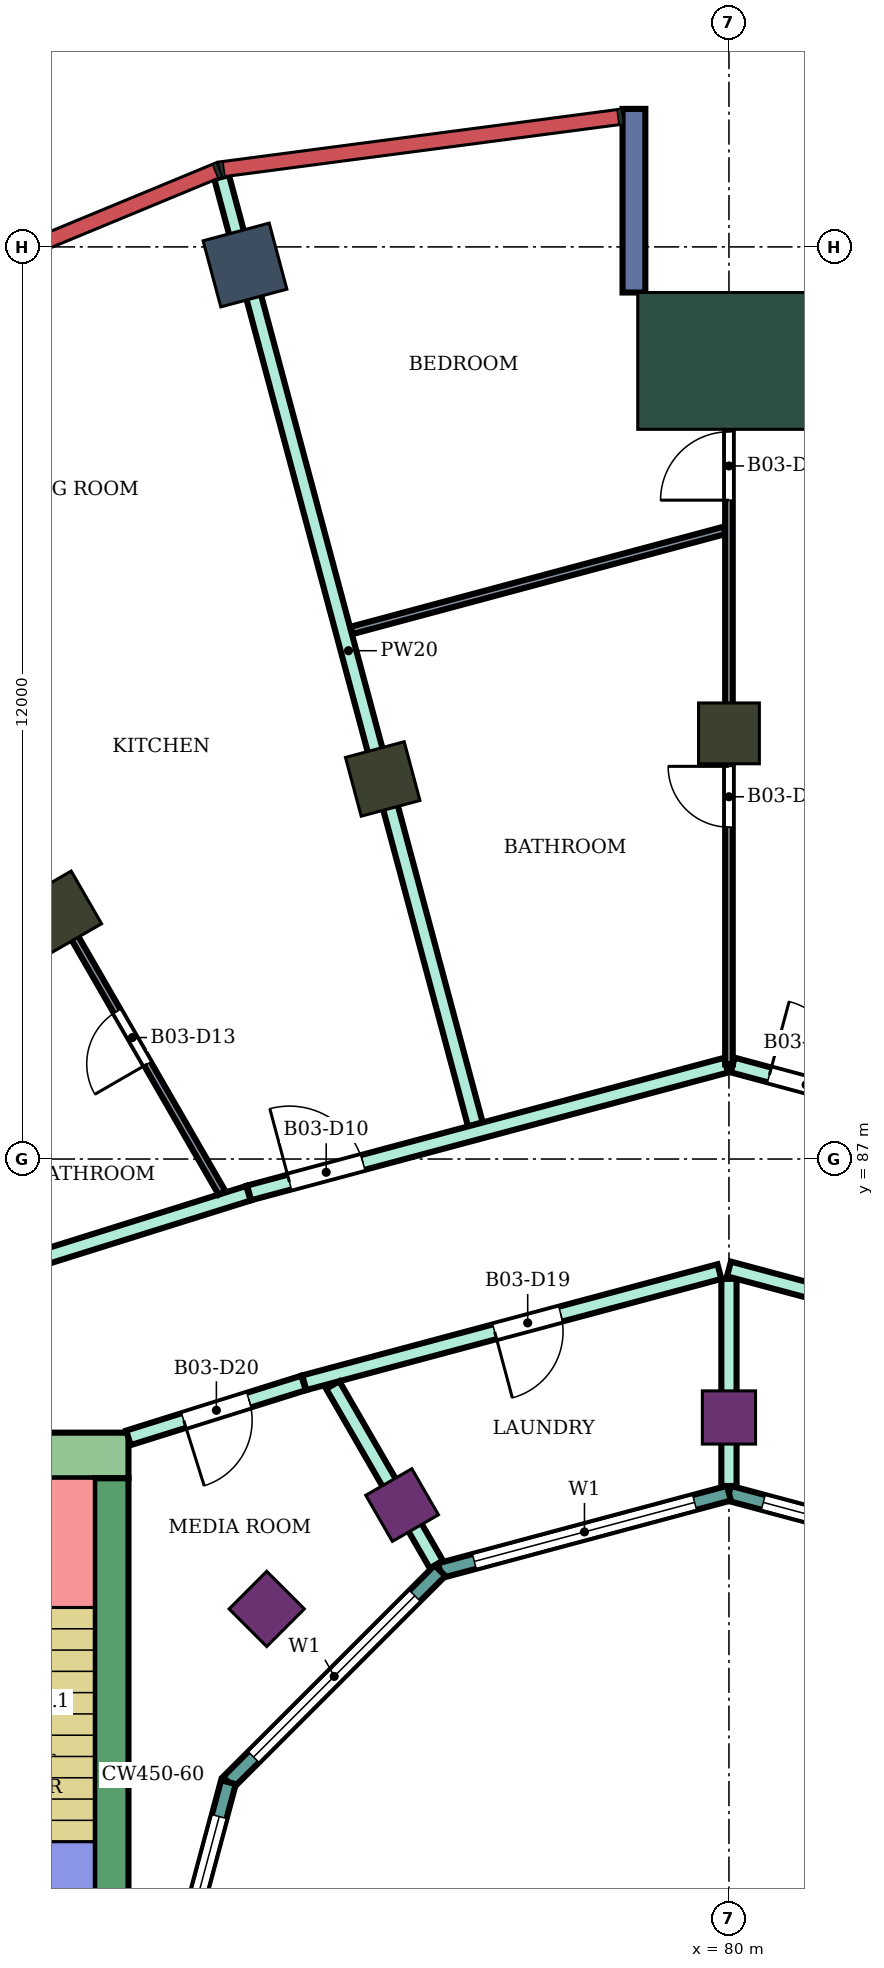
"""IFC4 building model, lengths in metres.
Left out: names, types, materials, properties, quantities, classifications, styles, units other than length and angle.
Written with IfcOpenShell. Run it as: python <this file> out.ifc"""

import sys

from ifc_helpers import new_model, si_unit, direction, frame, frame_2d, origin, origin_2d, place, context, subcontext, project, spatial, rectangle, extrude, element, fill, save


model = new_model("IFC4")
c1 = context("Model", 3, precision=1e-05, world=origin(), true_north=direction((0.0, 1.0)))
c2 = subcontext(c1, "Body", "Model", "MODEL_VIEW")
j1 = project(units=[si_unit("LENGTHUNIT", "METRE"), si_unit("PLANEANGLEUNIT", "RADIAN")], contexts=[c1])
p1 = place(None, origin())
s1 = spatial("IfcSite", under=j1, at=p1, CompositionType="ELEMENT")
p2 = place(p1, origin())
s2 = spatial("IfcBuilding", under=s1, at=p2, CompositionType="ELEMENT")
p3 = place(p2, frame((0.0, 0.0, 241.5)))
s3 = spatial("IfcBuildingStorey", under=s2, at=p3, CompositionType="ELEMENT", Elevation=241.5)
p4 = place(p3, frame((73.633, 98.762, 0.0), z_axis=(0.0, 0.0, 1.0), x_axis=(-0.258819045103, 0.965925826289, 0.0)))
e1 = element("IfcColumn", 1, at=p4, inside=s3, PredefinedType="COLUMN", context=c2, shape_type="SweptSolid", body=[
    extrude(rectangle(XDim=0.9, YDim=0.9, at=origin_2d()), origin(), (0.0, 0.0, 1.0), 4.2),
])
for number, where, z_axis, x_axis in (
    (2, (80.0, 92.6, 0.0), (0.0, 0.0, 1.0), (0.0, 1.0, 0.0)),
    (3, (75.445, 92.0, 0.0), (0.0, 0.0, 1.0), (-0.259, 0.966, 0.0)),
    (4, (71.2, 90.242, 0.0), (0.0, 0.0, 1.0), (-0.5, 0.866, 0.0)),
):
    element("IfcColumn", number, at=place(p3, frame(where, z_axis=z_axis, x_axis=x_axis)), inside=s3, PredefinedType="COLUMN", context=c2, shape_type="SweptSolid", body=[
        extrude(rectangle(XDim=0.8, YDim=0.8, at=origin_2d()), origin(), (0.0, 0.0, 1.0), 4.2),
    ])
for number, where, z_axis, x_axis in (
    (5, (80.0, 83.6, 0.0), (0.0, 0.0, 1.0), (0.0, 1.0, 0.0)),
    (6, (75.7, 82.448, 0.0), (0.0, 0.0, 1.0), (-0.5, 0.866, 0.0)),
    (7, (73.919, 81.081, 0.0), (0.0, 0.0, 1.0), (-0.707, 0.707, 0.0)),
):
    element("IfcColumn", number, at=place(p3, frame(where, z_axis=z_axis, x_axis=x_axis)), inside=s3, PredefinedType="COLUMN", context=c2, shape_type="SweptSolid", body=[
        extrude(rectangle(XDim=0.7, YDim=0.7, at=origin_2d()), origin(), (0.0, 0.0, 1.0), 4.2),
    ])
p5 = place(p3, frame((80.0, 97.5, 0.0), z_axis=(0.0, 0.0, 1.0), x_axis=(0.0, 1.0, 0.0)))
e8 = element("IfcColumn", 8, at=p5, inside=s3, PredefinedType="COLUMN", context=c2, shape_type="SweptSolid", body=[
    extrude(rectangle(XDim=1.8, YDim=2.4, at=origin_2d()), origin(), (0.0, 0.0, 1.0), 4.2),
])
p6 = place(p3, frame((72.1, 83.1, 0.0), z_axis=(0.0, 0.0, 1.0), x_axis=(-1.0, 0.0, 0.0)))
e9 = element("IfcWall", 9, at=p6, inside=s3, PredefinedType="SHEAR", context=c2, shape_type="SweptSolid", body=[
    extrude(rectangle(XDim=14.9, YDim=0.6, at=frame_2d((7.45, 0.0))), origin(), (0.0, 0.0, 1.0), 3.88),
])
p7 = place(p6, frame((4.2, 0.0, 0.0)))
e10 = element("IfcOpeningElement", 10, at=p7, cuts=e9, PredefinedType="OPENING", context=c2, shape_type="SweptSolid", body=[
    extrude(rectangle(XDim=2.4, YDim=2.4, at=frame_2d((1.2, 1.2))), frame((0.0, 0.31, 0.0), z_axis=(0.0, -1.0, 0.0), x_axis=(1.0, 0.0, 0.0)), (0.0, 0.0, 1.0), 0.62),
])
p8 = place(p3, frame((71.875, 82.8, 0.0), z_axis=(0.0, 0.0, 1.0), x_axis=(0.0, -1.0, 0.0)))
e11 = element("IfcWall", 11, at=p8, inside=s3, PredefinedType="SHEAR", context=c2, shape_type="SweptSolid", body=[
    extrude(rectangle(XDim=7.8, YDim=0.45, at=frame_2d((3.9, 0.0))), origin(), (0.0, 0.0, 1.0), 3.88),
])
p9 = place(p3, frame((78.75, 98.4, 0.0), z_axis=(0.0, 0.0, 1.0), x_axis=(0.0, 1.0, 0.0)))
e12 = element("IfcWall", 12, at=p9, inside=s3, PredefinedType="NOTDEFINED", context=c2, shape_type="SweptSolid", body=[
    extrude(rectangle(XDim=2.416, YDim=0.3, at=frame_2d((1.208, 0.0))), origin(), (0.0, 0.0, 1.0), 4.2),
])
p10 = place(p3, frame((83.802, 81.585, 0.0), z_axis=(0.0, 0.0, 1.0), x_axis=(-0.965933654434, 0.258789828301, 0.0)))
e13 = element("IfcWall", 13, at=p10, inside=s3, PredefinedType="NOTDEFINED", context=c2, shape_type="SweptSolid", body=[
    extrude(rectangle(XDim=3.936, YDim=0.2, at=frame_2d((1.968, 0.0))), origin(), (0.0, 0.0, 1.0), 4.2),
])
p11 = place(p10, frame((0.468, 0.0, 0.9)))
e14 = element("IfcOpeningElement", 14, at=p11, cuts=e13, PredefinedType="OPENING", context=c2, shape_type="SweptSolid", body=[
    extrude(rectangle(XDim=3.0, YDim=2.3, at=frame_2d((1.5, 1.15))), frame((0.0, 0.11, 0.0), z_axis=(0.0, -1.0, 0.0), x_axis=(1.0, 0.0, 0.0)), (0.0, 0.0, 1.0), 0.22),
])
p12 = place(p3, frame((80.0, 82.604, 0.0), z_axis=(0.0, 0.0, 1.0), x_axis=(-0.965933654434, -0.258789828301, 0.0)))
e15 = element("IfcWall", 15, at=p12, inside=s3, PredefinedType="NOTDEFINED", context=c2, shape_type="SweptSolid", body=[
    extrude(rectangle(XDim=3.936, YDim=0.2, at=frame_2d((1.968, 0.0))), origin(), (0.0, 0.0, 1.0), 4.2),
])
p13 = place(p12, frame((0.468, 0.0, 0.9)))
e16 = element("IfcOpeningElement", 16, at=p13, cuts=e15, PredefinedType="OPENING", context=c2, shape_type="SweptSolid", body=[
    extrude(rectangle(XDim=3.0, YDim=2.3, at=frame_2d((1.5, 1.15))), frame((0.0, 0.11, 0.0), z_axis=(0.0, -1.0, 0.0), x_axis=(1.0, 0.0, 0.0)), (0.0, 0.0, 1.0), 0.22),
])
p14 = place(p3, frame((76.198, 81.585, 0.0), z_axis=(0.0, 0.0, 1.0), x_axis=(-0.707106781187, -0.707106781187, 0.0)))
e17 = element("IfcWall", 17, at=p14, inside=s3, PredefinedType="NOTDEFINED", context=c2, shape_type="SweptSolid", body=[
    extrude(rectangle(XDim=3.936, YDim=0.2, at=frame_2d((1.968, 0.0))), origin(), (0.0, 0.0, 1.0), 4.2),
])
p15 = place(p14, frame((0.468, 0.0, 0.9)))
e18 = element("IfcOpeningElement", 18, at=p15, cuts=e17, PredefinedType="OPENING", context=c2, shape_type="SweptSolid", body=[
    extrude(rectangle(XDim=3.0, YDim=2.3, at=frame_2d((1.5, 1.15))), frame((0.0, 0.11, 0.0), z_axis=(0.0, -1.0, 0.0), x_axis=(1.0, 0.0, 0.0)), (0.0, 0.0, 1.0), 0.22),
])
p16 = place(p3, frame((73.415, 78.802, 0.0), z_axis=(0.0, 0.0, 1.0), x_axis=(-0.258789828301, -0.965933654434, 0.0)))
e19 = element("IfcWall", 19, at=p16, inside=s3, PredefinedType="NOTDEFINED", context=c2, shape_type="SweptSolid", body=[
    extrude(rectangle(XDim=3.936, YDim=0.2, at=frame_2d((1.968, 0.0))), origin(), (0.0, 0.0, 1.0), 4.2),
])
p17 = place(p16, frame((0.468, 0.0, 0.9)))
e20 = element("IfcOpeningElement", 20, at=p17, cuts=e19, PredefinedType="OPENING", context=c2, shape_type="SweptSolid", body=[
    extrude(rectangle(XDim=3.0, YDim=2.3, at=frame_2d((1.5, 1.15))), frame((0.0, 0.11, 0.0), z_axis=(0.0, -1.0, 0.0), x_axis=(1.0, 0.0, 0.0)), (0.0, 0.0, 1.0), 0.22),
])
p18 = place(p3, frame((68.2, 84.834, 0.0), z_axis=(0.0, 0.0, 1.0), x_axis=(0.954272398161, 0.298938438661, 0.0)))
e21 = element("IfcWall", 21, at=p18, inside=s3, PredefinedType="PARTITIONING", context=c2, shape_type="SweptSolid", body=[
    extrude(rectangle(XDim=5.74, YDim=0.2, at=frame_2d((2.87, 0.0))), origin(), (0.0, 0.0, 1.0), 3.75),
])
p19 = place(p3, frame((72.1, 83.332, 0.0), z_axis=(0.0, 0.0, 1.0), x_axis=(0.954233106619, 0.299063836383, 0.0)))
e22 = element("IfcWall", 22, at=p19, inside=s3, PredefinedType="PARTITIONING", context=c2, shape_type="SweptSolid", body=[
    extrude(rectangle(XDim=2.414, YDim=0.2, at=frame_2d((1.207, 0.0))), origin(), (0.0, 0.0, 1.0), 3.75),
])
p20 = place(p19, frame((0.762, 0.0, 0.0)))
e23 = element("IfcOpeningElement", 23, at=p20, cuts=e22, PredefinedType="OPENING", context=c2, shape_type="SweptSolid", body=[
    extrude(rectangle(XDim=0.9, YDim=2.1, at=frame_2d((0.45, 1.05))), frame((0.0, 0.11, 0.0), z_axis=(0.0, -1.0, 0.0), x_axis=(1.0, 0.0, 0.0)), (0.0, 0.0, 1.0), 0.22),
])
p21 = place(p3, frame((73.325, 99.92, 0.0), z_axis=(0.0, 0.0, 1.0), x_axis=(0.258745857482, -0.965945433881, 0.0)))
e24 = element("IfcWall", 24, at=p21, inside=s3, PredefinedType="PARTITIONING", context=c2, shape_type="SweptSolid", body=[
    extrude(rectangle(XDim=12.904, YDim=0.2, at=frame_2d((6.452, 0.0))), origin(), (0.0, 0.0, 1.0), 3.75),
])
p22 = place(p3, frame((73.687, 86.554, 0.0), z_axis=(0.0, 0.0, 1.0), x_axis=(0.96595928904, 0.258694128106, 0.0)))
e25 = element("IfcWall", 25, at=p22, inside=s3, PredefinedType="PARTITIONING", context=c2, shape_type="SweptSolid", body=[
    extrude(rectangle(XDim=6.496, YDim=0.2, at=frame_2d((3.248, 0.0))), origin(), (0.0, 0.0, 1.0), 3.75),
])
p23 = place(p22, frame((0.55, 0.0, 0.0)))
e26 = element("IfcOpeningElement", 26, at=p23, cuts=e25, PredefinedType="OPENING", context=c2, shape_type="SweptSolid", body=[
    extrude(rectangle(XDim=1.0, YDim=2.1, at=frame_2d((0.5, 1.05))), frame((0.0, 0.11, 0.0), z_axis=(0.0, -1.0, 0.0), x_axis=(1.0, 0.0, 0.0)), (0.0, 0.0, 1.0), 0.22),
])
p24 = place(p3, frame((74.413, 84.057, 0.0), z_axis=(0.0, 0.0, 1.0), x_axis=(0.965972135939, 0.258646153246, 0.0)))
e27 = element("IfcWall", 27, at=p24, inside=s3, PredefinedType="PARTITIONING", context=c2, shape_type="SweptSolid", body=[
    extrude(rectangle(XDim=5.654, YDim=0.2, at=frame_2d((2.827, 0.0))), origin(), (0.0, 0.0, 1.0), 3.75),
])
p25 = place(p24, frame((2.593, 0.0, 0.0)))
e28 = element("IfcOpeningElement", 28, at=p25, cuts=e27, PredefinedType="OPENING", context=c2, shape_type="SweptSolid", body=[
    extrude(rectangle(XDim=0.9, YDim=2.1, at=frame_2d((0.45, 1.05))), frame((0.0, 0.11, 0.0), z_axis=(0.0, -1.0, 0.0), x_axis=(1.0, 0.0, 0.0)), (0.0, 0.0, 1.0), 0.22),
])
p26 = place(p3, frame((74.787, 84.027, 0.0), z_axis=(0.0, 0.0, 1.0), x_axis=(0.500079107518, -0.86597972622, 0.0)))
e29 = element("IfcWall", 29, at=p26, inside=s3, PredefinedType="PARTITIONING", context=c2, shape_type="SweptSolid", body=[
    extrude(rectangle(XDim=2.726, YDim=0.2, at=frame_2d((1.363, 0.0))), origin(), (0.0, 0.0, 1.0), 3.75),
])
p27 = place(p3, frame((80.0, 82.699, 0.0), z_axis=(0.0, 0.0, 1.0), x_axis=(0.0, 1.0, 0.0)))
e30 = element("IfcWall", 30, at=p27, inside=s3, PredefinedType="PARTITIONING", context=c2, shape_type="SweptSolid", body=[
    extrude(rectangle(XDim=2.725, YDim=0.2, at=frame_2d((1.363, 0.0))), origin(), (0.0, 0.0, 1.0), 3.75),
])
p28 = place(p3, frame((80.0, 85.554, 0.0), z_axis=(0.0, 0.0, 1.0), x_axis=(0.965928989968, -0.258807237802, 0.0)))
e31 = element("IfcWall", 31, at=p28, inside=s3, PredefinedType="PARTITIONING", context=c2, shape_type="SweptSolid", body=[
    extrude(rectangle(XDim=5.774, YDim=0.2, at=frame_2d((2.887, 0.0))), origin(), (0.0, 0.0, 1.0), 3.75),
])
p29 = place(p28, frame((2.292, 0.0, 0.0)))
e32 = element("IfcOpeningElement", 32, at=p29, cuts=e31, PredefinedType="OPENING", context=c2, shape_type="SweptSolid", body=[
    extrude(rectangle(XDim=0.9, YDim=2.1, at=frame_2d((0.45, 1.05))), frame((0.0, 0.11, 0.0), z_axis=(0.0, -1.0, 0.0), x_axis=(1.0, 0.0, 0.0)), (0.0, 0.0, 1.0), 0.22),
])
p30 = place(p3, frame((80.049, 88.237, 0.0), z_axis=(0.0, 0.0, 1.0), x_axis=(0.965582990495, -0.260095152718, 0.0)))
e33 = element("IfcWall", 33, at=p30, inside=s3, PredefinedType="PARTITIONING", context=c2, shape_type="SweptSolid", body=[
    extrude(rectangle(XDim=6.476, YDim=0.2, at=frame_2d((3.238, 0.0))), origin(), (0.0, 0.0, 1.0), 3.75),
])
p31 = place(p30, frame((0.5, 0.0, 0.0)))
e34 = element("IfcOpeningElement", 34, at=p31, cuts=e33, PredefinedType="OPENING", context=c2, shape_type="SweptSolid", body=[
    extrude(rectangle(XDim=1.0, YDim=2.1, at=frame_2d((0.5, 1.05))), frame((0.0, 0.11, 0.0), z_axis=(0.0, -1.0, 0.0), x_axis=(1.0, 0.0, 0.0)), (0.0, 0.0, 1.0), 0.22),
])
p32 = place(p3, frame((67.104, 97.343, 0.0), z_axis=(0.0, 0.0, 1.0), x_axis=(0.499891560959, -0.866088002043, 0.0)))
e35 = element("IfcWall", 35, at=p32, inside=s3, PredefinedType="PARTITIONING", context=c2, shape_type="SweptSolid", body=[
    extrude(rectangle(XDim=12.456, YDim=0.1, at=frame_2d((6.228, 0.0))), origin(), (0.0, 0.0, 1.0), 3.75),
])
p33 = place(p32, frame((2.538, 0.0, 0.0)))
e36 = element("IfcOpeningElement", 36, at=p33, cuts=e35, PredefinedType="OPENING", context=c2, shape_type="SweptSolid", body=[
    extrude(rectangle(XDim=0.9, YDim=2.1, at=frame_2d((0.45, 1.05))), frame((0.0, 0.06, 0.0), z_axis=(0.0, -1.0, 0.0), x_axis=(1.0, 0.0, 0.0)), (0.0, 0.0, 1.0), 0.12),
])
p34 = place(p32, frame((9.697, 0.0, 0.0)))
e37 = element("IfcOpeningElement", 37, at=p34, cuts=e35, PredefinedType="OPENING", context=c2, shape_type="SweptSolid", body=[
    extrude(rectangle(XDim=0.8, YDim=2.1, at=frame_2d((0.4, 1.05))), frame((0.0, 0.06, 0.0), z_axis=(0.0, -1.0, 0.0), x_axis=(1.0, 0.0, 0.0)), (0.0, 0.0, 1.0), 0.12),
])
p35 = place(p3, frame((75.035, 93.955, 0.0), z_axis=(0.0, 0.0, 1.0), x_axis=(0.965868648254, 0.259032342228, 0.0)))
e38 = element("IfcWall", 38, at=p35, inside=s3, PredefinedType="PARTITIONING", context=c2, shape_type="SweptSolid", body=[
    extrude(rectangle(XDim=5.08, YDim=0.1, at=frame_2d((2.54, 0.0))), origin(), (0.0, 0.0, 1.0), 3.75),
])
p36 = place(p3, frame((80.0, 88.246, 0.0), z_axis=(0.0, 0.0, 1.0), x_axis=(0.0, 1.0, 0.0)))
e39 = element("IfcWall", 39, at=p36, inside=s3, PredefinedType="PARTITIONING", context=c2, shape_type="SweptSolid", body=[
    extrude(rectangle(XDim=9.954, YDim=0.1, at=frame_2d((4.977, 0.0))), origin(), (0.0, 0.0, 1.0), 3.75),
])
p37 = place(p36, frame((7.422, 0.0, 0.0)))
e40 = element("IfcOpeningElement", 40, at=p37, cuts=e39, PredefinedType="OPENING", context=c2, shape_type="SweptSolid", body=[
    extrude(rectangle(XDim=0.9, YDim=2.1, at=frame_2d((0.45, 1.05))), frame((0.0, 0.06, 0.0), z_axis=(0.0, -1.0, 0.0), x_axis=(1.0, 0.0, 0.0)), (0.0, 0.0, 1.0), 0.12),
])
p38 = place(p36, frame((3.12, 0.0, 0.0)))
e41 = element("IfcOpeningElement", 41, at=p38, cuts=e39, PredefinedType="OPENING", context=c2, shape_type="SweptSolid", body=[
    extrude(rectangle(XDim=0.8, YDim=2.1, at=frame_2d((0.4, 1.05))), frame((0.0, 0.06, 0.0), z_axis=(0.0, -1.0, 0.0), x_axis=(1.0, 0.0, 0.0)), (0.0, 0.0, 1.0), 0.12),
])
p39 = place(p11, origin())
e42 = element("IfcWindow", 42, at=p39, inside=s3, PartitioningType="SINGLE_PANEL", PredefinedType="WINDOW", context=c2, shape_type="SweptSolid", body=[
    extrude(rectangle(XDim=3.0, YDim=2.3, at=frame_2d((1.5, 1.15))), frame((0.0, 0.03, 0.0), z_axis=(0.0, -1.0, 0.0), x_axis=(1.0, 0.0, 0.0)), (0.0, 0.0, 1.0), 0.06),
])
fill(e14, e42)
p40 = place(p13, origin())
e43 = element("IfcWindow", 43, at=p40, inside=s3, PartitioningType="SINGLE_PANEL", PredefinedType="WINDOW", context=c2, shape_type="SweptSolid", body=[
    extrude(rectangle(XDim=3.0, YDim=2.3, at=frame_2d((1.5, 1.15))), frame((0.0, 0.03, 0.0), z_axis=(0.0, -1.0, 0.0), x_axis=(1.0, 0.0, 0.0)), (0.0, 0.0, 1.0), 0.06),
])
fill(e16, e43)
p41 = place(p15, origin())
e44 = element("IfcWindow", 44, at=p41, inside=s3, PartitioningType="SINGLE_PANEL", PredefinedType="WINDOW", context=c2, shape_type="SweptSolid", body=[
    extrude(rectangle(XDim=3.0, YDim=2.3, at=frame_2d((1.5, 1.15))), frame((0.0, 0.03, 0.0), z_axis=(0.0, -1.0, 0.0), x_axis=(1.0, 0.0, 0.0)), (0.0, 0.0, 1.0), 0.06),
])
fill(e18, e44)
p42 = place(p17, origin())
e45 = element("IfcWindow", 45, at=p42, inside=s3, PartitioningType="SINGLE_PANEL", PredefinedType="WINDOW", context=c2, shape_type="SweptSolid", body=[
    extrude(rectangle(XDim=3.0, YDim=2.3, at=frame_2d((1.5, 1.15))), frame((0.0, 0.03, 0.0), z_axis=(0.0, -1.0, 0.0), x_axis=(1.0, 0.0, 0.0)), (0.0, 0.0, 1.0), 0.06),
])
fill(e20, e45)
p43 = place(p31, origin())
e46 = element("IfcDoor", 46, at=p43, inside=s3, OperationType="SINGLE_SWING_LEFT", PredefinedType="DOOR", context=c2, shape_type="SweptSolid", body=[
    extrude(rectangle(XDim=1.0, YDim=2.1, at=frame_2d((0.5, 1.05))), frame((0.0, 0.025, 0.0), z_axis=(0.0, -1.0, 0.0), x_axis=(1.0, 0.0, 0.0)), (0.0, 0.0, 1.0), 0.05),
])
fill(e34, e46)
p44 = place(p37, origin())
e47 = element("IfcDoor", 47, at=p44, inside=s3, OperationType="SINGLE_SWING_LEFT", PredefinedType="DOOR", context=c2, shape_type="SweptSolid", body=[
    extrude(rectangle(XDim=0.9, YDim=2.1, at=frame_2d((0.45, 1.05))), frame((0.0, 0.025, 0.0), z_axis=(0.0, -1.0, 0.0), x_axis=(1.0, 0.0, 0.0)), (0.0, 0.0, 1.0), 0.05),
])
fill(e40, e47)
p45 = place(p38, origin())
e48 = element("IfcDoor", 48, at=p45, inside=s3, OperationType="SINGLE_SWING_RIGHT", PredefinedType="DOOR", context=c2, shape_type="SweptSolid", body=[
    extrude(rectangle(XDim=0.8, YDim=2.1, at=frame_2d((0.4, 1.05))), frame((0.0, 0.025, 0.0), z_axis=(0.0, -1.0, 0.0), x_axis=(1.0, 0.0, 0.0)), (0.0, 0.0, 1.0), 0.05),
])
fill(e41, e48)
p46 = place(p23, origin())
e49 = element("IfcDoor", 49, at=p46, inside=s3, OperationType="SINGLE_SWING_LEFT", PredefinedType="DOOR", context=c2, shape_type="SweptSolid", body=[
    extrude(rectangle(XDim=1.0, YDim=2.1, at=frame_2d((0.5, 1.05))), frame((0.0, 0.025, 0.0), z_axis=(0.0, -1.0, 0.0), x_axis=(1.0, 0.0, 0.0)), (0.0, 0.0, 1.0), 0.05),
])
fill(e26, e49)
p47 = place(p34, frame((0.8, 0.0, 0.0), z_axis=(0.0, 0.0, 1.0), x_axis=(-1.0, 0.0, 0.0)))
e50 = element("IfcDoor", 50, at=p47, inside=s3, OperationType="SINGLE_SWING_LEFT", PredefinedType="DOOR", context=c2, shape_type="SweptSolid", body=[
    extrude(rectangle(XDim=0.8, YDim=2.1, at=frame_2d((0.4, 1.05))), frame((0.0, 0.025, 0.0), z_axis=(0.0, -1.0, 0.0), x_axis=(1.0, 0.0, 0.0)), (0.0, 0.0, 1.0), 0.05),
])
fill(e37, e50)
p48 = place(p25, frame((0.9, 0.0, 0.0), z_axis=(0.0, 0.0, 1.0), x_axis=(-1.0, 0.0, 0.0)))
e51 = element("IfcDoor", 51, at=p48, inside=s3, OperationType="SINGLE_SWING_RIGHT", PredefinedType="DOOR", context=c2, shape_type="SweptSolid", body=[
    extrude(rectangle(XDim=0.9, YDim=2.1, at=frame_2d((0.45, 1.05))), frame((0.0, 0.025, 0.0), z_axis=(0.0, -1.0, 0.0), x_axis=(1.0, 0.0, 0.0)), (0.0, 0.0, 1.0), 0.05),
])
fill(e28, e51)
p49 = place(p20, frame((0.9, 0.0, 0.0), z_axis=(0.0, 0.0, 1.0), x_axis=(-1.0, 0.0, 0.0)))
e52 = element("IfcDoor", 52, at=p49, inside=s3, OperationType="SINGLE_SWING_RIGHT", PredefinedType="DOOR", context=c2, shape_type="SweptSolid", body=[
    extrude(rectangle(XDim=0.9, YDim=2.1, at=frame_2d((0.45, 1.05))), frame((0.0, 0.025, 0.0), z_axis=(0.0, -1.0, 0.0), x_axis=(1.0, 0.0, 0.0)), (0.0, 0.0, 1.0), 0.05),
])
fill(e23, e52)
save(model, sys.argv[1])
